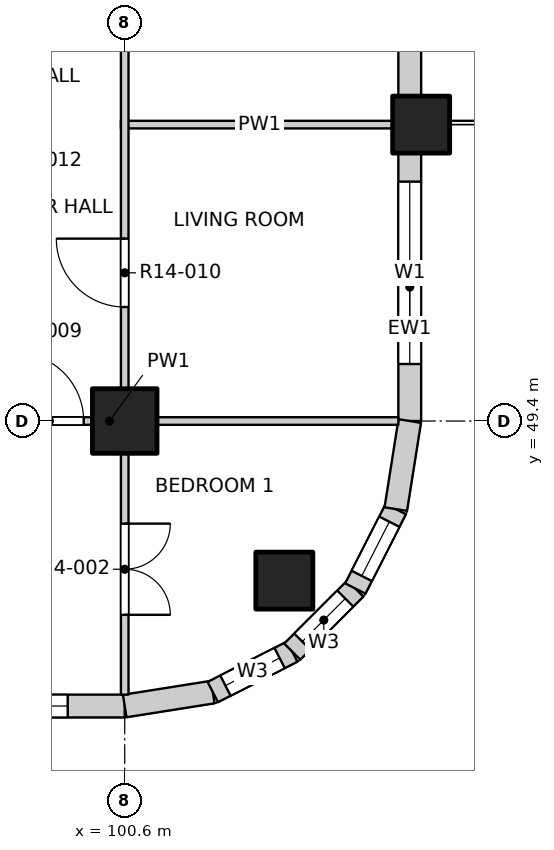
"""IFC4 building model, lengths in metres.
Left out: names, types, materials, properties, quantities, classifications, styles, units other than length and angle.
Written with IfcOpenShell. Run it as: python <this file> out.ifc"""

import sys

from ifc_helpers import new_model, si_unit, direction, frame, frame_2d, origin, origin_2d, place, context, subcontext, project, spatial, rectangle, extrude, element, fill, save


model = new_model("IFC4")
c1 = context("Model", 3, precision=1e-05, world=origin(), true_north=direction((0.0, 1.0)))
c2 = subcontext(c1, "Body", "Model", "MODEL_VIEW")
j1 = project(units=[si_unit("LENGTHUNIT", "METRE"), si_unit("PLANEANGLEUNIT", "RADIAN")], contexts=[c1])
p1 = place(None, origin())
s1 = spatial("IfcSite", under=j1, at=p1, CompositionType="ELEMENT")
p2 = place(p1, origin())
s2 = spatial("IfcBuilding", under=s1, at=p2, CompositionType="ELEMENT")
p3 = place(p2, frame((0.0, 0.0, 155.4)))
s3 = spatial("IfcBuildingStorey", under=s2, at=p3, CompositionType="ELEMENT", Elevation=155.4)
for number, where, z_axis, x_axis in (
    (1, (102.7, 47.3, -0.25), (0.0, 0.0, 1.0), (1.0, 0.0, 0.0)),
    (2, (104.5, 53.3, -0.25), (0.0, 0.0, 1.0), (1.0, 0.0, 0.0)),
):
    element("IfcColumn", number, at=place(p3, frame(where, z_axis=z_axis, x_axis=x_axis)), inside=s3, PredefinedType="COLUMN", context=c2, shape_type="SweptSolid", body=[
        extrude(rectangle(XDim=0.75, YDim=0.75, at=origin_2d()), origin(), (0.0, 0.0, 1.0), 3.4),
    ])
p4 = place(p3, frame((100.6, 49.4, -0.25), z_axis=(0.0, 0.0, 1.0), x_axis=(1.0, 0.0, 0.0)))
e3 = element("IfcColumn", 3, at=p4, inside=s3, PredefinedType="COLUMN", context=c2, shape_type="SweptSolid", body=[
    extrude(rectangle(XDim=0.85, YDim=0.85, at=origin_2d()), origin(), (0.0, 0.0, 1.0), 3.4),
])
p5 = place(p3, frame((97.075, 45.65, 0.0), z_axis=(0.0, 0.0, 1.0), x_axis=(1.0, 0.0, 0.0)))
e4 = element("IfcWall", 4, at=p5, inside=s3, PredefinedType="SOLIDWALL", context=c2, shape_type="SweptSolid", body=[
    extrude(rectangle(XDim=3.525, YDim=0.3, at=frame_2d((1.763, 0.0))), origin(), (0.0, 0.0, 1.0), 2.7),
])
p6 = place(p5, frame((0.375, 0.0, 0.9)))
e5 = element("IfcOpeningElement", 5, at=p6, cuts=e4, PredefinedType="OPENING", context=c2, shape_type="SweptSolid", body=[
    extrude(rectangle(XDim=2.4, YDim=1.8, at=frame_2d((1.2, 0.9))), frame((0.0, 0.16, 0.0), z_axis=(0.0, -1.0, 0.0), x_axis=(1.0, 0.0, 0.0)), (0.0, 0.0, 1.0), 0.32),
])
p7 = place(p3, frame((104.35, 49.4, 0.0), z_axis=(0.0, 0.0, 1.0), x_axis=(0.0, 1.0, 0.0)))
e6 = element("IfcWall", 6, at=p7, inside=s3, PredefinedType="SOLIDWALL", context=c2, shape_type="SweptSolid", body=[
    extrude(rectangle(XDim=3.525, YDim=0.3, at=frame_2d((1.763, 0.0))), origin(), (0.0, 0.0, 1.0), 2.7),
])
p8 = place(p7, frame((0.75, 0.0, 0.9)))
e7 = element("IfcOpeningElement", 7, at=p8, cuts=e6, PredefinedType="OPENING", context=c2, shape_type="SweptSolid", body=[
    extrude(rectangle(XDim=2.4, YDim=1.8, at=frame_2d((1.2, 0.9))), frame((0.0, 0.16, 0.0), z_axis=(0.0, -1.0, 0.0), x_axis=(1.0, 0.0, 0.0)), (0.0, 0.0, 1.0), 0.32),
])
p9 = place(p3, frame((104.35, 53.675, 0.0), z_axis=(0.0, 0.0, 1.0), x_axis=(0.0, 1.0, 0.0)))
e8 = element("IfcWall", 8, at=p9, inside=s3, PredefinedType="SOLIDWALL", context=c2, shape_type="SweptSolid", body=[
    extrude(rectangle(XDim=7.05, YDim=0.3, at=frame_2d((3.525, 0.0))), origin(), (0.0, 0.0, 1.0), 2.7),
])
p10 = place(p9, frame((0.675, 0.0, 0.0)))
e9 = element("IfcOpeningElement", 9, at=p10, cuts=e8, PredefinedType="OPENING", context=c2, shape_type="SweptSolid", body=[
    extrude(rectangle(XDim=1.8, YDim=2.4, at=frame_2d((0.9, 1.2))), frame((0.0, 0.16, 0.0), z_axis=(0.0, -1.0, 0.0), x_axis=(1.0, 0.0, 0.0)), (0.0, 0.0, 1.0), 0.32),
])
p11 = place(p9, frame((4.275, 0.0, 0.9)))
e10 = element("IfcOpeningElement", 10, at=p11, cuts=e8, PredefinedType="OPENING", context=c2, shape_type="SweptSolid", body=[
    extrude(rectangle(XDim=2.4, YDim=1.8, at=frame_2d((1.2, 0.9))), frame((0.0, 0.16, 0.0), z_axis=(0.0, -1.0, 0.0), x_axis=(1.0, 0.0, 0.0)), (0.0, 0.0, 1.0), 0.32),
])
p12 = place(p3, frame((100.6, 45.65, 0.0), z_axis=(0.0, 0.0, 1.0), x_axis=(0.987678452879, 0.156496880861, 0.0)))
e11 = element("IfcWall", 11, at=p12, inside=s3, PredefinedType="SOLIDWALL", context=c2, shape_type="SweptSolid", body=[
    extrude(rectangle(XDim=1.173, YDim=0.3, at=frame_2d((0.586, 0.0))), origin(), (0.0, 0.0, 1.0), 2.7),
])
p13 = place(p3, frame((101.759, 45.833, 0.0), z_axis=(0.0, 0.0, 1.0), x_axis=(0.890988677504, 0.454025524128, 0.0)))
e12 = element("IfcWall", 12, at=p13, inside=s3, PredefinedType="SOLIDWALL", context=c2, shape_type="SweptSolid", body=[
    extrude(rectangle(XDim=1.173, YDim=0.3, at=frame_2d((0.587, 0.0))), origin(), (0.0, 0.0, 1.0), 2.7),
])
p14 = place(p13, frame((0.187, 0.0, 0.9)))
e13 = element("IfcOpeningElement", 13, at=p14, cuts=e12, PredefinedType="OPENING", context=c2, shape_type="SweptSolid", body=[
    extrude(rectangle(XDim=0.8, YDim=1.2, at=frame_2d((0.4, 0.6))), frame((0.0, 0.16, 0.0), z_axis=(0.0, -1.0, 0.0), x_axis=(1.0, 0.0, 0.0)), (0.0, 0.0, 1.0), 0.32),
])
p15 = place(p3, frame((102.804, 46.366, 0.0), z_axis=(0.0, 0.0, 1.0), x_axis=(0.707106781187, 0.707106781187, 0.0)))
e14 = element("IfcWall", 14, at=p15, inside=s3, PredefinedType="SOLIDWALL", context=c2, shape_type="SweptSolid", body=[
    extrude(rectangle(XDim=1.173, YDim=0.3, at=frame_2d((0.586, 0.0))), origin(), (0.0, 0.0, 1.0), 2.7),
])
p16 = place(p15, frame((0.187, 0.0, 0.9)))
e15 = element("IfcOpeningElement", 15, at=p16, cuts=e14, PredefinedType="OPENING", context=c2, shape_type="SweptSolid", body=[
    extrude(rectangle(XDim=0.8, YDim=1.2, at=frame_2d((0.4, 0.6))), frame((0.0, 0.16, 0.0), z_axis=(0.0, -1.0, 0.0), x_axis=(1.0, 0.0, 0.0)), (0.0, 0.0, 1.0), 0.32),
])
p17 = place(p3, frame((103.634, 47.196, 0.0), z_axis=(0.0, 0.0, 1.0), x_axis=(0.454025524128, 0.890988677504, 0.0)))
e16 = element("IfcWall", 16, at=p17, inside=s3, PredefinedType="SOLIDWALL", context=c2, shape_type="SweptSolid", body=[
    extrude(rectangle(XDim=1.173, YDim=0.3, at=frame_2d((0.587, 0.0))), origin(), (0.0, 0.0, 1.0), 2.7),
])
p18 = place(p17, frame((0.187, 0.0, 0.9)))
e17 = element("IfcOpeningElement", 17, at=p18, cuts=e16, PredefinedType="OPENING", context=c2, shape_type="SweptSolid", body=[
    extrude(rectangle(XDim=0.8, YDim=1.2, at=frame_2d((0.4, 0.6))), frame((0.0, 0.16, 0.0), z_axis=(0.0, -1.0, 0.0), x_axis=(1.0, 0.0, 0.0)), (0.0, 0.0, 1.0), 0.32),
])
p19 = place(p3, frame((104.167, 48.241, 0.0), z_axis=(0.0, 0.0, 1.0), x_axis=(0.156496880861, 0.987678452879, 0.0)))
e18 = element("IfcWall", 18, at=p19, inside=s3, PredefinedType="SOLIDWALL", context=c2, shape_type="SweptSolid", body=[
    extrude(rectangle(XDim=1.173, YDim=0.3, at=frame_2d((0.586, 0.0))), origin(), (0.0, 0.0, 1.0), 2.7),
])
p20 = place(p3, frame((96.6, 49.4, 0.0), z_axis=(0.0, 0.0, 1.0), x_axis=(1.0, 0.0, 0.0)))
e19 = element("IfcWall", 19, at=p20, inside=s3, PredefinedType="PARTITIONING", context=c2, shape_type="SweptSolid", body=[
    extrude(rectangle(XDim=7.6, YDim=0.1, at=frame_2d((3.8, 0.0))), origin(), (0.0, 0.0, 1.0), 3.15),
])
p21 = place(p20, frame((2.56, 0.0, 0.0)))
e20 = element("IfcOpeningElement", 20, at=p21, cuts=e19, PredefinedType="OPENING", context=c2, shape_type="SweptSolid", body=[
    extrude(rectangle(XDim=0.9, YDim=2.1, at=frame_2d((0.45, 1.05))), frame((0.0, 0.06, 0.0), z_axis=(0.0, -1.0, 0.0), x_axis=(1.0, 0.0, 0.0)), (0.0, 0.0, 1.0), 0.12),
])
p22 = place(p3, frame((100.55, 53.3, 0.0), z_axis=(0.0, 0.0, 1.0), x_axis=(1.0, 0.0, 0.0)))
e21 = element("IfcWall", 21, at=p22, inside=s3, PredefinedType="PARTITIONING", context=c2, shape_type="SweptSolid", body=[
    extrude(rectangle(XDim=3.65, YDim=0.1, at=frame_2d((1.825, 0.0))), origin(), (0.0, 0.0, 1.0), 3.15),
])
p23 = place(p3, frame((100.6, 45.8, 0.0), z_axis=(0.0, 0.0, 1.0), x_axis=(0.0, 1.0, 0.0)))
e22 = element("IfcWall", 22, at=p23, inside=s3, PredefinedType="PARTITIONING", context=c2, shape_type="SweptSolid", body=[
    extrude(rectangle(XDim=38.4, YDim=0.1, at=frame_2d((19.2, 0.0))), origin(), (0.0, 0.0, 1.0), 3.15),
])
p24 = place(p23, frame((1.05, 0.0, 0.0)))
e23 = element("IfcOpeningElement", 23, at=p24, cuts=e22, PredefinedType="OPENING", context=c2, shape_type="SweptSolid", body=[
    extrude(rectangle(XDim=1.2, YDim=2.1, at=frame_2d((0.6, 1.05))), frame((0.0, 0.06, 0.0), z_axis=(0.0, -1.0, 0.0), x_axis=(1.0, 0.0, 0.0)), (0.0, 0.0, 1.0), 0.12),
])
p25 = place(p23, frame((5.1, 0.0, 0.0)))
e24 = element("IfcOpeningElement", 24, at=p25, cuts=e22, PredefinedType="OPENING", context=c2, shape_type="SweptSolid", body=[
    extrude(rectangle(XDim=0.9, YDim=2.1, at=frame_2d((0.45, 1.05))), frame((0.0, 0.06, 0.0), z_axis=(0.0, -1.0, 0.0), x_axis=(1.0, 0.0, 0.0)), (0.0, 0.0, 1.0), 0.12),
])
p26 = place(p23, frame((9.0, 0.0, 0.0)))
e25 = element("IfcOpeningElement", 25, at=p26, cuts=e22, PredefinedType="OPENING", context=c2, shape_type="SweptSolid", body=[
    extrude(rectangle(XDim=0.9, YDim=2.1, at=frame_2d((0.45, 1.05))), frame((0.0, 0.06, 0.0), z_axis=(0.0, -1.0, 0.0), x_axis=(1.0, 0.0, 0.0)), (0.0, 0.0, 1.0), 0.12),
])
p27 = place(p23, frame((12.9, 0.0, 0.0)))
e26 = element("IfcOpeningElement", 26, at=p27, cuts=e22, PredefinedType="OPENING", context=c2, shape_type="SweptSolid", body=[
    extrude(rectangle(XDim=0.9, YDim=2.1, at=frame_2d((0.45, 1.05))), frame((0.0, 0.06, 0.0), z_axis=(0.0, -1.0, 0.0), x_axis=(1.0, 0.0, 0.0)), (0.0, 0.0, 1.0), 0.12),
])
p28 = place(p23, frame((16.8, 0.0, 0.0)))
e27 = element("IfcOpeningElement", 27, at=p28, cuts=e22, PredefinedType="OPENING", context=c2, shape_type="SweptSolid", body=[
    extrude(rectangle(XDim=0.9, YDim=2.1, at=frame_2d((0.45, 1.05))), frame((0.0, 0.06, 0.0), z_axis=(0.0, -1.0, 0.0), x_axis=(1.0, 0.0, 0.0)), (0.0, 0.0, 1.0), 0.12),
])
p29 = place(p23, frame((20.7, 0.0, 0.0)))
e28 = element("IfcOpeningElement", 28, at=p29, cuts=e22, PredefinedType="OPENING", context=c2, shape_type="SweptSolid", body=[
    extrude(rectangle(XDim=0.9, YDim=2.1, at=frame_2d((0.45, 1.05))), frame((0.0, 0.06, 0.0), z_axis=(0.0, -1.0, 0.0), x_axis=(1.0, 0.0, 0.0)), (0.0, 0.0, 1.0), 0.12),
])
p30 = place(p23, frame((24.6, 0.0, 0.0)))
e29 = element("IfcOpeningElement", 29, at=p30, cuts=e22, PredefinedType="OPENING", context=c2, shape_type="SweptSolid", body=[
    extrude(rectangle(XDim=0.9, YDim=2.1, at=frame_2d((0.45, 1.05))), frame((0.0, 0.06, 0.0), z_axis=(0.0, -1.0, 0.0), x_axis=(1.0, 0.0, 0.0)), (0.0, 0.0, 1.0), 0.12),
])
p31 = place(p23, frame((28.5, 0.0, 0.0)))
e30 = element("IfcOpeningElement", 30, at=p31, cuts=e22, PredefinedType="OPENING", context=c2, shape_type="SweptSolid", body=[
    extrude(rectangle(XDim=0.9, YDim=2.1, at=frame_2d((0.45, 1.05))), frame((0.0, 0.06, 0.0), z_axis=(0.0, -1.0, 0.0), x_axis=(1.0, 0.0, 0.0)), (0.0, 0.0, 1.0), 0.12),
])
p32 = place(p23, frame((32.4, 0.0, 0.0)))
e31 = element("IfcOpeningElement", 31, at=p32, cuts=e22, PredefinedType="OPENING", context=c2, shape_type="SweptSolid", body=[
    extrude(rectangle(XDim=0.9, YDim=2.1, at=frame_2d((0.45, 1.05))), frame((0.0, 0.06, 0.0), z_axis=(0.0, -1.0, 0.0), x_axis=(1.0, 0.0, 0.0)), (0.0, 0.0, 1.0), 0.12),
])
p33 = place(p23, frame((36.15, 0.0, 0.0)))
e32 = element("IfcOpeningElement", 32, at=p33, cuts=e22, PredefinedType="OPENING", context=c2, shape_type="SweptSolid", body=[
    extrude(rectangle(XDim=1.2, YDim=2.1, at=frame_2d((0.6, 1.05))), frame((0.0, 0.06, 0.0), z_axis=(0.0, -1.0, 0.0), x_axis=(1.0, 0.0, 0.0)), (0.0, 0.0, 1.0), 0.12),
])
p34 = place(p6, origin())
e33 = element("IfcWindow", 33, at=p34, inside=s3, PartitioningType="DOUBLE_PANEL_VERTICAL", PredefinedType="WINDOW", context=c2, shape_type="SweptSolid", body=[
    extrude(rectangle(XDim=2.4, YDim=1.8, at=frame_2d((1.2, 0.9))), frame((0.0, 0.03, 0.0), z_axis=(0.0, -1.0, 0.0), x_axis=(1.0, 0.0, 0.0)), (0.0, 0.0, 1.0), 0.06),
])
fill(e5, e33)
p35 = place(p8, origin())
e34 = element("IfcWindow", 34, at=p35, inside=s3, PartitioningType="DOUBLE_PANEL_VERTICAL", PredefinedType="WINDOW", context=c2, shape_type="SweptSolid", body=[
    extrude(rectangle(XDim=2.4, YDim=1.8, at=frame_2d((1.2, 0.9))), frame((0.0, 0.03, 0.0), z_axis=(0.0, -1.0, 0.0), x_axis=(1.0, 0.0, 0.0)), (0.0, 0.0, 1.0), 0.06),
])
fill(e7, e34)
p36 = place(p14, origin())
e35 = element("IfcWindow", 35, at=p36, inside=s3, PartitioningType="SINGLE_PANEL", PredefinedType="WINDOW", context=c2, shape_type="SweptSolid", body=[
    extrude(rectangle(XDim=0.8, YDim=1.2, at=frame_2d((0.4, 0.6))), frame((0.0, 0.03, 0.0), z_axis=(0.0, -1.0, 0.0), x_axis=(1.0, 0.0, 0.0)), (0.0, 0.0, 1.0), 0.06),
])
fill(e13, e35)
p37 = place(p16, origin())
e36 = element("IfcWindow", 36, at=p37, inside=s3, PartitioningType="SINGLE_PANEL", PredefinedType="WINDOW", context=c2, shape_type="SweptSolid", body=[
    extrude(rectangle(XDim=0.8, YDim=1.2, at=frame_2d((0.4, 0.6))), frame((0.0, 0.03, 0.0), z_axis=(0.0, -1.0, 0.0), x_axis=(1.0, 0.0, 0.0)), (0.0, 0.0, 1.0), 0.06),
])
fill(e15, e36)
p38 = place(p18, origin())
e37 = element("IfcWindow", 37, at=p38, inside=s3, PartitioningType="SINGLE_PANEL", PredefinedType="WINDOW", context=c2, shape_type="SweptSolid", body=[
    extrude(rectangle(XDim=0.8, YDim=1.2, at=frame_2d((0.4, 0.6))), frame((0.0, 0.03, 0.0), z_axis=(0.0, -1.0, 0.0), x_axis=(1.0, 0.0, 0.0)), (0.0, 0.0, 1.0), 0.06),
])
fill(e17, e37)
p39 = place(p24, origin())
e38 = element("IfcDoor", 38, at=p39, inside=s3, OperationType="DOUBLE_DOOR_SINGLE_SWING", PredefinedType="DOOR", context=c2, shape_type="SweptSolid", body=[
    extrude(rectangle(XDim=1.2, YDim=2.1, at=frame_2d((0.6, 1.05))), frame((0.0, 0.025, 0.0), z_axis=(0.0, -1.0, 0.0), x_axis=(1.0, 0.0, 0.0)), (0.0, 0.0, 1.0), 0.05),
])
fill(e23, e38)
p40 = place(p21, origin())
e39 = element("IfcDoor", 39, at=p40, inside=s3, OperationType="SINGLE_SWING_LEFT", PredefinedType="DOOR", context=c2, shape_type="SweptSolid", body=[
    extrude(rectangle(XDim=0.9, YDim=2.1, at=frame_2d((0.45, 1.05))), frame((0.0, 0.025, 0.0), z_axis=(0.0, -1.0, 0.0), x_axis=(1.0, 0.0, 0.0)), (0.0, 0.0, 1.0), 0.05),
])
fill(e20, e39)
p41 = place(p25, origin())
e40 = element("IfcDoor", 40, at=p41, inside=s3, OperationType="SINGLE_SWING_RIGHT", PredefinedType="DOOR", context=c2, shape_type="SweptSolid", body=[
    extrude(rectangle(XDim=0.9, YDim=2.1, at=frame_2d((0.45, 1.05))), frame((0.0, 0.025, 0.0), z_axis=(0.0, -1.0, 0.0), x_axis=(1.0, 0.0, 0.0)), (0.0, 0.0, 1.0), 0.05),
])
fill(e24, e40)
save(model, sys.argv[1])
